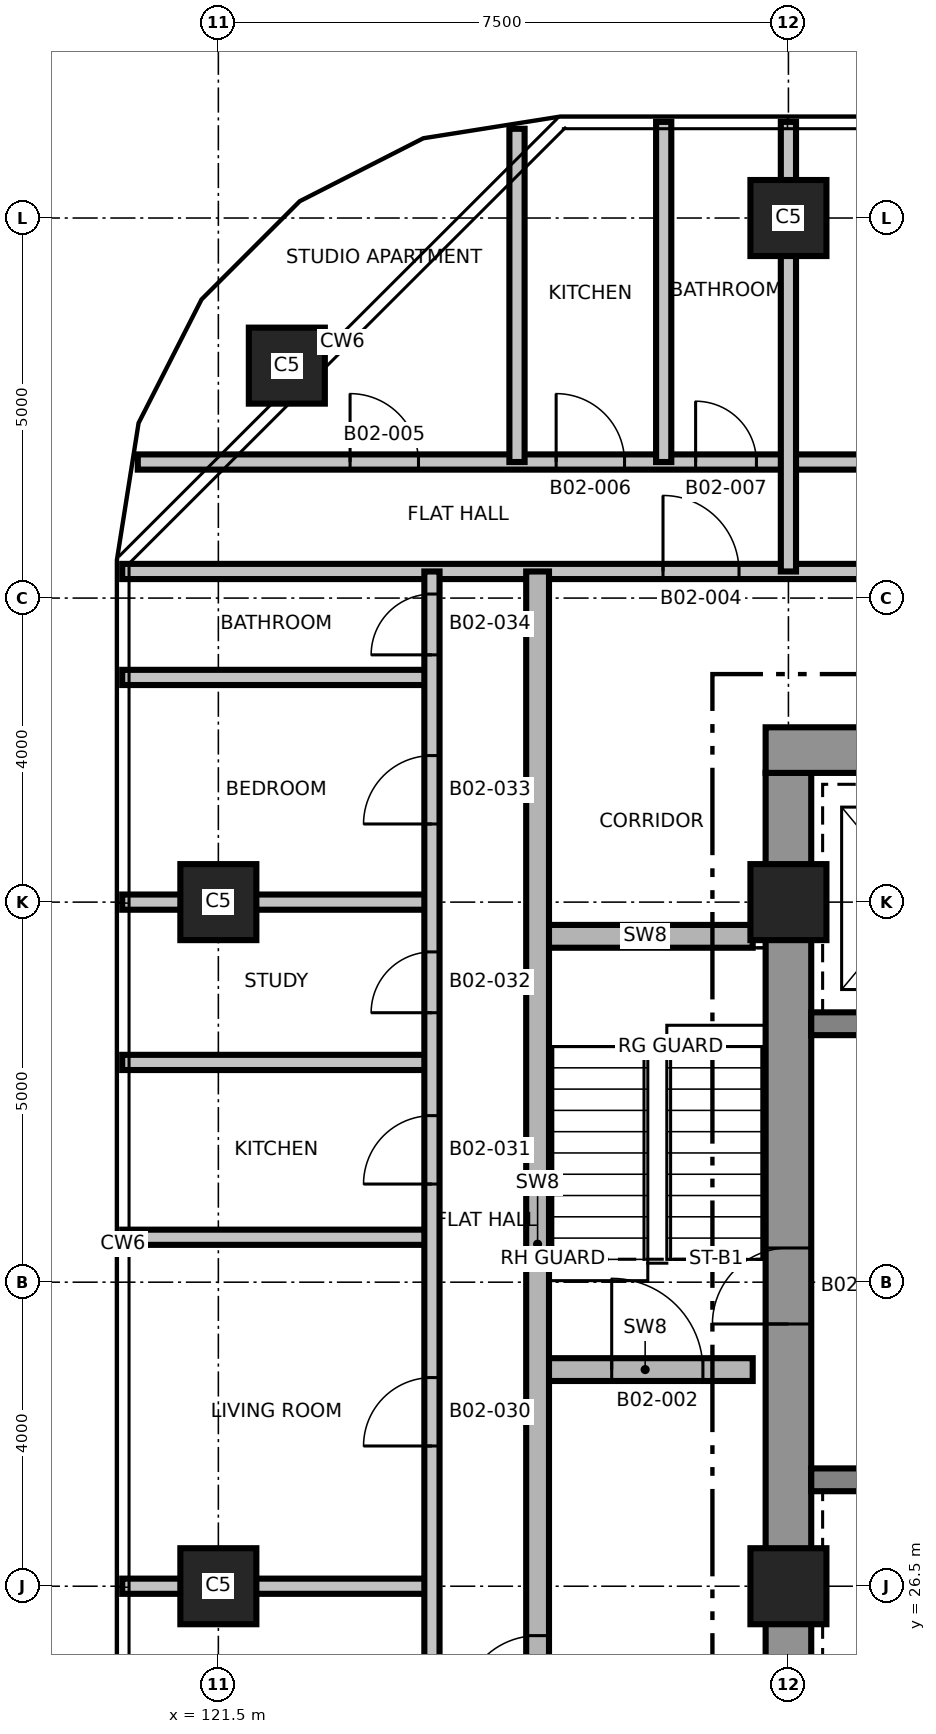
"""IFC4 building model, lengths in metres.
Left out: names, types, materials, properties, quantities, classifications, styles, units other than length and angle.
Written with IfcOpenShell. Run it as: python <this file> out.ifc"""

import sys

from ifc_helpers import new_model, si_unit, direction, frame, frame_2d, origin, origin_2d, place, context, subcontext, project, spatial, rectangle, extrude, element, fill, save


model = new_model("IFC4")
c1 = context("Model", 3, precision=1e-05, world=origin(), true_north=direction((0.0, 1.0)))
c2 = subcontext(c1, "Body", "Model", "MODEL_VIEW")
j1 = project(units=[si_unit("LENGTHUNIT", "METRE"), si_unit("PLANEANGLEUNIT", "RADIAN")], contexts=[c1])
p1 = place(None, origin())
s1 = spatial("IfcSite", under=j1, at=p1, CompositionType="ELEMENT")
p2 = place(p1, origin())
s2 = spatial("IfcBuilding", under=s1, at=p2, CompositionType="ELEMENT")
p3 = place(p2, frame((0.0, 0.0, 48.3)))
s3 = spatial("IfcBuildingStorey", under=s2, at=p3, CompositionType="ELEMENT", Elevation=48.3)
p4 = place(p3, frame((129.0, 24.8, 0.0), z_axis=(0.0, 0.0, 1.0), x_axis=(0.0, 1.0, 0.0)))
e1 = element("IfcWall", 1, at=p4, inside=s3, PredefinedType="SHEAR", context=c2, shape_type="SweptSolid", body=[
    extrude(rectangle(XDim=12.4, YDim=0.6, at=frame_2d((6.2, 0.0))), origin(), (0.0, 0.0, 1.0), 3.7),
])
p5 = place(p4, frame((5.15, 0.0, 0.0)))
e2 = element("IfcOpeningElement", 2, at=p5, cuts=e1, PredefinedType="OPENING", context=c2, shape_type="SweptSolid", body=[
    extrude(rectangle(XDim=1.0, YDim=2.1, at=frame_2d((0.5, 1.05))), frame((0.0, 0.31, 0.0), z_axis=(0.0, -1.0, 0.0), x_axis=(1.0, 0.0, 0.0)), (0.0, 0.0, 1.0), 0.62),
])
p6 = place(p3, frame((128.7, 37.5, 0.0), z_axis=(0.0, 0.0, 1.0), x_axis=(1.0, 0.0, 0.0)))
e3 = element("IfcWall", 3, at=p6, inside=s3, PredefinedType="SHEAR", context=c2, shape_type="SweptSolid", body=[
    extrude(rectangle(XDim=15.0, YDim=0.6, at=frame_2d((7.5, 0.0))), origin(), (0.0, 0.0, 1.0), 3.7),
])
p7 = place(p6, frame((9.65, 0.0, 0.0)))
e4 = element("IfcOpeningElement", 4, at=p7, cuts=e3, PredefinedType="OPENING", context=c2, shape_type="SweptSolid", body=[
    extrude(rectangle(XDim=1.5, YDim=2.1, at=frame_2d((0.75, 1.05))), frame((0.0, 0.31, 0.0), z_axis=(0.0, -1.0, 0.0), x_axis=(1.0, 0.0, 0.0)), (0.0, 0.0, 1.0), 0.62),
])
p8 = place(p6, frame((12.85, 0.0, 0.0)))
e5 = element("IfcOpeningElement", 5, at=p8, cuts=e3, PredefinedType="OPENING", context=c2, shape_type="SweptSolid", body=[
    extrude(rectangle(XDim=0.9, YDim=2.1, at=frame_2d((0.45, 1.05))), frame((0.0, 0.31, 0.0), z_axis=(0.0, -1.0, 0.0), x_axis=(1.0, 0.0, 0.0)), (0.0, 0.0, 1.0), 0.62),
])
p9 = place(p6, frame((5.55, 0.0, 0.0)))
e6 = element("IfcOpeningElement", 6, at=p9, cuts=e3, PredefinedType="OPENING", context=c2, shape_type="SweptSolid", body=[
    extrude(rectangle(XDim=0.9, YDim=2.1, at=frame_2d((0.45, 1.05))), frame((0.0, 0.31, 0.0), z_axis=(0.0, -1.0, 0.0), x_axis=(1.0, 0.0, 0.0)), (0.0, 0.0, 1.0), 0.62),
])
p10 = place(p3, frame((129.3, 27.9, 0.0), z_axis=(0.0, 0.0, 1.0), x_axis=(1.0, 0.0, 0.0)))
e7 = element("IfcWall", 7, at=p10, inside=s3, PredefinedType="SHEAR", context=c2, shape_type="SweptSolid", body=[
    extrude(rectangle(XDim=2.65, YDim=0.3, at=frame_2d((1.325, 0.0))), origin(), (0.0, 0.0, 1.0), 3.7),
])
p11 = place(p3, frame((129.3, 33.9, 0.0), z_axis=(0.0, 0.0, 1.0), x_axis=(1.0, 0.0, 0.0)))
e8 = element("IfcWall", 8, at=p11, inside=s3, PredefinedType="SHEAR", context=c2, shape_type="SweptSolid", body=[
    extrude(rectangle(XDim=2.65, YDim=0.3, at=frame_2d((1.325, 0.0))), origin(), (0.0, 0.0, 1.0), 3.7),
])
p12 = place(p11, frame((1.05, 0.0, 0.0)))
e9 = element("IfcOpeningElement", 9, at=p12, cuts=e8, PredefinedType="OPENING", context=c2, shape_type="SweptSolid", body=[
    extrude(rectangle(XDim=1.3, YDim=2.4, at=frame_2d((0.65, 1.2))), frame((0.0, 0.16, 0.0), z_axis=(0.0, -1.0, 0.0), x_axis=(1.0, 0.0, 0.0)), (0.0, 0.0, 1.0), 0.32),
])
for number, where, z_axis, x_axis in (
    (10, (121.5, 26.5, 0.0), (0.0, 0.0, 1.0), (1.0, 0.0, 0.0)),
    (11, (129.0, 26.5, 0.0), (0.0, 0.0, 1.0), (1.0, 0.0, 0.0)),
    (12, (121.5, 35.5, 0.0), (0.0, 0.0, 1.0), (1.0, 0.0, 0.0)),
    (13, (129.0, 35.5, 0.0), (0.0, 0.0, 1.0), (1.0, 0.0, 0.0)),
    (14, (122.401, 42.558, 0.0), (0.0, 0.0, 1.0), (1.0, 0.0, 0.0)),
    (15, (129.0, 44.5, 0.0), (0.0, 0.0, 1.0), (1.0, 0.0, 0.0)),
):
    element("IfcColumn", number, at=place(p3, frame(where, z_axis=z_axis, x_axis=x_axis)), inside=s3, PredefinedType="COLUMN", context=c2, shape_type="SweptSolid", body=[
        extrude(rectangle(XDim=1.0, YDim=1.0, at=origin_2d()), origin(), (0.0, 0.0, 1.0), 3.7),
    ])
p13 = place(p3, frame((120.235, 26.5, 0.0), z_axis=(0.0, 0.0, 1.0), x_axis=(1.0, 0.0, 0.0)))
e16 = element("IfcWall", 16, at=p13, inside=s3, PredefinedType="PARTITIONING", context=c2, shape_type="SweptSolid", body=[
    extrude(rectangle(XDim=4.075, YDim=0.2, at=frame_2d((2.038, 0.0))), origin(), (0.0, 0.0, 1.0), 3.4),
])
p14 = place(p3, frame((125.7, 29.35, 0.0), z_axis=(0.0, 0.0, 1.0), x_axis=(1.0, 0.0, 0.0)))
e17 = element("IfcWall", 17, at=p14, inside=s3, PredefinedType="SHEAR", context=c2, shape_type="SweptSolid", body=[
    extrude(rectangle(XDim=2.83, YDim=0.3, at=frame_2d((1.415, 0.0))), origin(), (0.0, 0.0, 1.0), 3.4),
])
p15 = place(p14, frame((0.975, 0.0, 0.0)))
e18 = element("IfcOpeningElement", 18, at=p15, cuts=e17, PredefinedType="OPENING", context=c2, shape_type="SweptSolid", body=[
    extrude(rectangle(XDim=1.2, YDim=2.1, at=frame_2d((0.6, 1.05))), frame((0.0, 0.16, 0.0), z_axis=(0.0, -1.0, 0.0), x_axis=(1.0, 0.0, 0.0)), (0.0, 0.0, 1.0), 0.32),
])
for number, where, z_axis, x_axis in (
    (19, (120.235, 31.091, 0.0), (0.0, 0.0, 1.0), (1.0, 0.0, 0.0)),
    (20, (120.235, 33.391, 0.0), (0.0, 0.0, 1.0), (1.0, 0.0, 0.0)),
):
    element("IfcWall", number, at=place(p3, frame(where, z_axis=z_axis, x_axis=x_axis)), inside=s3, PredefinedType="PARTITIONING", context=c2, shape_type="SweptSolid", body=[
        extrude(rectangle(XDim=4.075, YDim=0.2, at=frame_2d((2.038, 0.0))), origin(), (0.0, 0.0, 1.0), 3.4),
    ])
p16 = place(p3, frame((125.7, 35.05, 0.0), z_axis=(0.0, 0.0, 1.0), x_axis=(1.0, 0.0, 0.0)))
e21 = element("IfcWall", 21, at=p16, inside=s3, PredefinedType="SHEAR", context=c2, shape_type="SweptSolid", body=[
    extrude(rectangle(XDim=2.83, YDim=0.3, at=frame_2d((1.415, 0.0))), origin(), (0.0, 0.0, 1.0), 3.4),
])
for number, where, z_axis, x_axis in (
    (22, (120.235, 35.5, 0.0), (0.0, 0.0, 1.0), (1.0, 0.0, 0.0)),
    (23, (120.235, 38.456, 0.0), (0.0, 0.0, 1.0), (1.0, 0.0, 0.0)),
):
    element("IfcWall", number, at=place(p3, frame(where, z_axis=z_axis, x_axis=x_axis)), inside=s3, PredefinedType="PARTITIONING", context=c2, shape_type="SweptSolid", body=[
        extrude(rectangle(XDim=4.075, YDim=0.2, at=frame_2d((2.038, 0.0))), origin(), (0.0, 0.0, 1.0), 3.4),
    ])
p17 = place(p3, frame((120.235, 39.85, 0.0), z_axis=(0.0, 0.0, 1.0), x_axis=(1.0, 0.0, 0.0)))
e24 = element("IfcWall", 24, at=p17, inside=s3, PredefinedType="PARTITIONING", context=c2, shape_type="SweptSolid", body=[
    extrude(rectangle(XDim=32.53, YDim=0.2, at=frame_2d((16.265, 0.0))), origin(), (0.0, 0.0, 1.0), 3.4),
])
p18 = place(p17, frame((7.115, 0.0, 0.0)))
e25 = element("IfcOpeningElement", 25, at=p18, cuts=e24, PredefinedType="OPENING", context=c2, shape_type="SweptSolid", body=[
    extrude(rectangle(XDim=1.0, YDim=2.1, at=frame_2d((0.5, 1.05))), frame((0.0, 0.11, 0.0), z_axis=(0.0, -1.0, 0.0), x_axis=(1.0, 0.0, 0.0)), (0.0, 0.0, 1.0), 0.22),
])
p19 = place(p17, frame((15.765, 0.0, 0.0)))
e26 = element("IfcOpeningElement", 26, at=p19, cuts=e24, PredefinedType="OPENING", context=c2, shape_type="SweptSolid", body=[
    extrude(rectangle(XDim=1.0, YDim=2.1, at=frame_2d((0.5, 1.05))), frame((0.0, 0.11, 0.0), z_axis=(0.0, -1.0, 0.0), x_axis=(1.0, 0.0, 0.0)), (0.0, 0.0, 1.0), 0.22),
])
p20 = place(p17, frame((24.415, 0.0, 0.0)))
e27 = element("IfcOpeningElement", 27, at=p20, cuts=e24, PredefinedType="OPENING", context=c2, shape_type="SweptSolid", body=[
    extrude(rectangle(XDim=1.0, YDim=2.1, at=frame_2d((0.5, 1.05))), frame((0.0, 0.11, 0.0), z_axis=(0.0, -1.0, 0.0), x_axis=(1.0, 0.0, 0.0)), (0.0, 0.0, 1.0), 0.22),
])
p21 = place(p3, frame((120.44, 41.29, 0.0), z_axis=(0.0, 0.0, 1.0), x_axis=(1.0, 0.0, 0.0)))
e28 = element("IfcWall", 28, at=p21, inside=s3, PredefinedType="PARTITIONING", context=c2, shape_type="SweptSolid", body=[
    extrude(rectangle(XDim=32.12, YDim=0.2, at=frame_2d((16.06, 0.0))), origin(), (0.0, 0.0, 1.0), 3.4),
])
p22 = place(p21, frame((2.793, 0.0, 0.0)))
e29 = element("IfcOpeningElement", 29, at=p22, cuts=e28, PredefinedType="OPENING", context=c2, shape_type="SweptSolid", body=[
    extrude(rectangle(XDim=0.9, YDim=2.1, at=frame_2d((0.45, 1.05))), frame((0.0, 0.11, 0.0), z_axis=(0.0, -1.0, 0.0), x_axis=(1.0, 0.0, 0.0)), (0.0, 0.0, 1.0), 0.22),
])
p23 = place(p21, frame((5.504, 0.0, 0.0)))
e30 = element("IfcOpeningElement", 30, at=p23, cuts=e28, PredefinedType="OPENING", context=c2, shape_type="SweptSolid", body=[
    extrude(rectangle(XDim=0.9, YDim=2.1, at=frame_2d((0.45, 1.05))), frame((0.0, 0.11, 0.0), z_axis=(0.0, -1.0, 0.0), x_axis=(1.0, 0.0, 0.0)), (0.0, 0.0, 1.0), 0.22),
])
p24 = place(p21, frame((7.339, 0.0, 0.0)))
e31 = element("IfcOpeningElement", 31, at=p24, cuts=e28, PredefinedType="OPENING", context=c2, shape_type="SweptSolid", body=[
    extrude(rectangle(XDim=0.8, YDim=2.1, at=frame_2d((0.4, 1.05))), frame((0.0, 0.11, 0.0), z_axis=(0.0, -1.0, 0.0), x_axis=(1.0, 0.0, 0.0)), (0.0, 0.0, 1.0), 0.22),
])
p25 = place(p21, frame((10.577, 0.0, 0.0)))
e32 = element("IfcOpeningElement", 32, at=p25, cuts=e28, PredefinedType="OPENING", context=c2, shape_type="SweptSolid", body=[
    extrude(rectangle(XDim=0.9, YDim=2.1, at=frame_2d((0.45, 1.05))), frame((0.0, 0.11, 0.0), z_axis=(0.0, -1.0, 0.0), x_axis=(1.0, 0.0, 0.0)), (0.0, 0.0, 1.0), 0.22),
])
p26 = place(p21, frame((14.327, 0.0, 0.0)))
e33 = element("IfcOpeningElement", 33, at=p26, cuts=e28, PredefinedType="OPENING", context=c2, shape_type="SweptSolid", body=[
    extrude(rectangle(XDim=0.9, YDim=2.1, at=frame_2d((0.45, 1.05))), frame((0.0, 0.11, 0.0), z_axis=(0.0, -1.0, 0.0), x_axis=(1.0, 0.0, 0.0)), (0.0, 0.0, 1.0), 0.22),
])
p27 = place(p21, frame((18.144, 0.0, 0.0)))
e34 = element("IfcOpeningElement", 34, at=p27, cuts=e28, PredefinedType="OPENING", context=c2, shape_type="SweptSolid", body=[
    extrude(rectangle(XDim=0.9, YDim=2.1, at=frame_2d((0.45, 1.05))), frame((0.0, 0.11, 0.0), z_axis=(0.0, -1.0, 0.0), x_axis=(1.0, 0.0, 0.0)), (0.0, 0.0, 1.0), 0.22),
])
p28 = place(p21, frame((21.944, 0.0, 0.0)))
e35 = element("IfcOpeningElement", 35, at=p28, cuts=e28, PredefinedType="OPENING", context=c2, shape_type="SweptSolid", body=[
    extrude(rectangle(XDim=0.8, YDim=2.1, at=frame_2d((0.4, 1.05))), frame((0.0, 0.11, 0.0), z_axis=(0.0, -1.0, 0.0), x_axis=(1.0, 0.0, 0.0)), (0.0, 0.0, 1.0), 0.22),
])
p29 = place(p21, frame((23.981, 0.0, 0.0)))
e36 = element("IfcOpeningElement", 36, at=p29, cuts=e28, PredefinedType="OPENING", context=c2, shape_type="SweptSolid", body=[
    extrude(rectangle(XDim=0.8, YDim=2.1, at=frame_2d((0.4, 1.05))), frame((0.0, 0.11, 0.0), z_axis=(0.0, -1.0, 0.0), x_axis=(1.0, 0.0, 0.0)), (0.0, 0.0, 1.0), 0.22),
])
p30 = place(p21, frame((25.716, 0.0, 0.0)))
e37 = element("IfcOpeningElement", 37, at=p30, cuts=e28, PredefinedType="OPENING", context=c2, shape_type="SweptSolid", body=[
    extrude(rectangle(XDim=0.9, YDim=2.1, at=frame_2d((0.45, 1.05))), frame((0.0, 0.11, 0.0), z_axis=(0.0, -1.0, 0.0), x_axis=(1.0, 0.0, 0.0)), (0.0, 0.0, 1.0), 0.22),
])
p31 = place(p21, frame((28.427, 0.0, 0.0)))
e38 = element("IfcOpeningElement", 38, at=p31, cuts=e28, PredefinedType="OPENING", context=c2, shape_type="SweptSolid", body=[
    extrude(rectangle(XDim=0.9, YDim=2.1, at=frame_2d((0.45, 1.05))), frame((0.0, 0.11, 0.0), z_axis=(0.0, -1.0, 0.0), x_axis=(1.0, 0.0, 0.0)), (0.0, 0.0, 1.0), 0.22),
])
p32 = place(p3, frame((124.31, 22.15, 0.0), z_axis=(0.0, 0.0, 1.0), x_axis=(0.0, 1.0, 0.0)))
e39 = element("IfcWall", 39, at=p32, inside=s3, PredefinedType="PARTITIONING", context=c2, shape_type="SweptSolid", body=[
    extrude(rectangle(XDim=17.7, YDim=0.2, at=frame_2d((8.85, 0.0))), origin(), (0.0, 0.0, 1.0), 3.4),
])
p33 = place(p32, frame((1.725, 0.0, 0.0)))
e40 = element("IfcOpeningElement", 40, at=p33, cuts=e39, PredefinedType="OPENING", context=c2, shape_type="SweptSolid", body=[
    extrude(rectangle(XDim=0.9, YDim=2.1, at=frame_2d((0.45, 1.05))), frame((0.0, 0.11, 0.0), z_axis=(0.0, -1.0, 0.0), x_axis=(1.0, 0.0, 0.0)), (0.0, 0.0, 1.0), 0.22),
])
p34 = place(p32, frame((6.195, 0.0, 0.0)))
e41 = element("IfcOpeningElement", 41, at=p34, cuts=e39, PredefinedType="OPENING", context=c2, shape_type="SweptSolid", body=[
    extrude(rectangle(XDim=0.9, YDim=2.1, at=frame_2d((0.45, 1.05))), frame((0.0, 0.11, 0.0), z_axis=(0.0, -1.0, 0.0), x_axis=(1.0, 0.0, 0.0)), (0.0, 0.0, 1.0), 0.22),
])
p35 = place(p32, frame((9.641, 0.0, 0.0)))
e42 = element("IfcOpeningElement", 42, at=p35, cuts=e39, PredefinedType="OPENING", context=c2, shape_type="SweptSolid", body=[
    extrude(rectangle(XDim=0.9, YDim=2.1, at=frame_2d((0.45, 1.05))), frame((0.0, 0.11, 0.0), z_axis=(0.0, -1.0, 0.0), x_axis=(1.0, 0.0, 0.0)), (0.0, 0.0, 1.0), 0.22),
])
p36 = place(p32, frame((11.895, 0.0, 0.0)))
e43 = element("IfcOpeningElement", 43, at=p36, cuts=e39, PredefinedType="OPENING", context=c2, shape_type="SweptSolid", body=[
    extrude(rectangle(XDim=0.8, YDim=2.1, at=frame_2d((0.4, 1.05))), frame((0.0, 0.11, 0.0), z_axis=(0.0, -1.0, 0.0), x_axis=(1.0, 0.0, 0.0)), (0.0, 0.0, 1.0), 0.22),
])
p37 = place(p32, frame((14.378, 0.0, 0.0)))
e44 = element("IfcOpeningElement", 44, at=p37, cuts=e39, PredefinedType="OPENING", context=c2, shape_type="SweptSolid", body=[
    extrude(rectangle(XDim=0.9, YDim=2.1, at=frame_2d((0.45, 1.05))), frame((0.0, 0.11, 0.0), z_axis=(0.0, -1.0, 0.0), x_axis=(1.0, 0.0, 0.0)), (0.0, 0.0, 1.0), 0.22),
])
p38 = place(p32, frame((16.603, 0.0, 0.0)))
e45 = element("IfcOpeningElement", 45, at=p38, cuts=e39, PredefinedType="OPENING", context=c2, shape_type="SweptSolid", body=[
    extrude(rectangle(XDim=0.8, YDim=2.1, at=frame_2d((0.4, 1.05))), frame((0.0, 0.11, 0.0), z_axis=(0.0, -1.0, 0.0), x_axis=(1.0, 0.0, 0.0)), (0.0, 0.0, 1.0), 0.22),
])
p39 = place(p3, frame((125.429, 41.29, 0.0), z_axis=(0.0, 0.0, 1.0), x_axis=(0.0, 1.0, 0.0)))
e46 = element("IfcWall", 46, at=p39, inside=s3, PredefinedType="PARTITIONING", context=c2, shape_type="SweptSolid", body=[
    extrude(rectangle(XDim=4.384, YDim=0.2, at=frame_2d((2.192, 0.0))), origin(), (0.0, 0.0, 1.0), 3.4),
])
p40 = place(p3, frame((125.7, 22.15, 0.0), z_axis=(0.0, 0.0, 1.0), x_axis=(0.0, 1.0, 0.0)))
e47 = element("IfcWall", 47, at=p40, inside=s3, PredefinedType="SHEAR", context=c2, shape_type="SweptSolid", body=[
    extrude(rectangle(XDim=17.7, YDim=0.3, at=frame_2d((8.85, 0.0))), origin(), (0.0, 0.0, 1.0), 3.4),
])
p41 = place(p40, frame((2.7, 0.0, 0.0)))
e48 = element("IfcOpeningElement", 48, at=p41, cuts=e47, PredefinedType="OPENING", context=c2, shape_type="SweptSolid", body=[
    extrude(rectangle(XDim=1.0, YDim=2.1, at=frame_2d((0.5, 1.05))), frame((0.0, 0.16, 0.0), z_axis=(0.0, -1.0, 0.0), x_axis=(1.0, 0.0, 0.0)), (0.0, 0.0, 1.0), 0.32),
])
p42 = place(p3, frame((127.359, 41.29, 0.0), z_axis=(0.0, 0.0, 1.0), x_axis=(0.0, 1.0, 0.0)))
e49 = element("IfcWall", 49, at=p42, inside=s3, PredefinedType="PARTITIONING", context=c2, shape_type="SweptSolid", body=[
    extrude(rectangle(XDim=4.475, YDim=0.2, at=frame_2d((2.237, 0.0))), origin(), (0.0, 0.0, 1.0), 3.4),
])
p43 = place(p3, frame((129.0, 39.85, 0.0), z_axis=(0.0, 0.0, 1.0), x_axis=(0.0, 1.0, 0.0)))
e50 = element("IfcWall", 50, at=p43, inside=s3, PredefinedType="PARTITIONING", context=c2, shape_type="SweptSolid", body=[
    extrude(rectangle(XDim=5.915, YDim=0.2, at=frame_2d((2.958, 0.0))), origin(), (0.0, 0.0, 1.0), 3.4),
])
p44 = place(p15, origin())
e51 = element("IfcDoor", 51, at=p44, inside=s3, OperationType="SINGLE_SWING_RIGHT", PredefinedType="DOOR", context=c2, shape_type="SweptSolid", body=[
    extrude(rectangle(XDim=1.2, YDim=2.1, at=frame_2d((0.6, 1.05))), frame((0.0, 0.025, 0.0), z_axis=(0.0, -1.0, 0.0), x_axis=(1.0, 0.0, 0.0)), (0.0, 0.0, 1.0), 0.05),
])
fill(e18, e51)
p45 = place(p18, origin())
e52 = element("IfcDoor", 52, at=p45, inside=s3, OperationType="SINGLE_SWING_RIGHT", PredefinedType="DOOR", context=c2, shape_type="SweptSolid", body=[
    extrude(rectangle(XDim=1.0, YDim=2.1, at=frame_2d((0.5, 1.05))), frame((0.0, 0.025, 0.0), z_axis=(0.0, -1.0, 0.0), x_axis=(1.0, 0.0, 0.0)), (0.0, 0.0, 1.0), 0.05),
])
fill(e25, e52)
p46 = place(p22, origin())
e53 = element("IfcDoor", 53, at=p46, inside=s3, OperationType="SINGLE_SWING_LEFT", PredefinedType="DOOR", context=c2, shape_type="SweptSolid", body=[
    extrude(rectangle(XDim=0.9, YDim=2.1, at=frame_2d((0.45, 1.05))), frame((0.0, 0.025, 0.0), z_axis=(0.0, -1.0, 0.0), x_axis=(1.0, 0.0, 0.0)), (0.0, 0.0, 1.0), 0.05),
])
fill(e29, e53)
p47 = place(p23, origin())
e54 = element("IfcDoor", 54, at=p47, inside=s3, OperationType="SINGLE_SWING_RIGHT", PredefinedType="DOOR", context=c2, shape_type="SweptSolid", body=[
    extrude(rectangle(XDim=0.9, YDim=2.1, at=frame_2d((0.45, 1.05))), frame((0.0, 0.025, 0.0), z_axis=(0.0, -1.0, 0.0), x_axis=(1.0, 0.0, 0.0)), (0.0, 0.0, 1.0), 0.05),
])
fill(e30, e54)
p48 = place(p24, origin())
e55 = element("IfcDoor", 55, at=p48, inside=s3, OperationType="SINGLE_SWING_LEFT", PredefinedType="DOOR", context=c2, shape_type="SweptSolid", body=[
    extrude(rectangle(XDim=0.8, YDim=2.1, at=frame_2d((0.4, 1.05))), frame((0.0, 0.025, 0.0), z_axis=(0.0, -1.0, 0.0), x_axis=(1.0, 0.0, 0.0)), (0.0, 0.0, 1.0), 0.05),
])
fill(e31, e55)
p49 = place(p41, origin())
e56 = element("IfcDoor", 56, at=p49, inside=s3, OperationType="SINGLE_SWING_RIGHT", PredefinedType="DOOR", context=c2, shape_type="SweptSolid", body=[
    extrude(rectangle(XDim=1.0, YDim=2.1, at=frame_2d((0.5, 1.05))), frame((0.0, 0.025, 0.0), z_axis=(0.0, -1.0, 0.0), x_axis=(1.0, 0.0, 0.0)), (0.0, 0.0, 1.0), 0.05),
])
fill(e48, e56)
p50 = place(p34, origin())
e57 = element("IfcDoor", 57, at=p50, inside=s3, OperationType="SINGLE_SWING_RIGHT", PredefinedType="DOOR", context=c2, shape_type="SweptSolid", body=[
    extrude(rectangle(XDim=0.9, YDim=2.1, at=frame_2d((0.45, 1.05))), frame((0.0, 0.025, 0.0), z_axis=(0.0, -1.0, 0.0), x_axis=(1.0, 0.0, 0.0)), (0.0, 0.0, 1.0), 0.05),
])
fill(e41, e57)
p51 = place(p35, origin())
e58 = element("IfcDoor", 58, at=p51, inside=s3, OperationType="SINGLE_SWING_LEFT", PredefinedType="DOOR", context=c2, shape_type="SweptSolid", body=[
    extrude(rectangle(XDim=0.9, YDim=2.1, at=frame_2d((0.45, 1.05))), frame((0.0, 0.025, 0.0), z_axis=(0.0, -1.0, 0.0), x_axis=(1.0, 0.0, 0.0)), (0.0, 0.0, 1.0), 0.05),
])
fill(e42, e58)
p52 = place(p36, origin())
e59 = element("IfcDoor", 59, at=p52, inside=s3, OperationType="SINGLE_SWING_RIGHT", PredefinedType="DOOR", context=c2, shape_type="SweptSolid", body=[
    extrude(rectangle(XDim=0.8, YDim=2.1, at=frame_2d((0.4, 1.05))), frame((0.0, 0.025, 0.0), z_axis=(0.0, -1.0, 0.0), x_axis=(1.0, 0.0, 0.0)), (0.0, 0.0, 1.0), 0.05),
])
fill(e43, e59)
p53 = place(p37, origin())
e60 = element("IfcDoor", 60, at=p53, inside=s3, OperationType="SINGLE_SWING_LEFT", PredefinedType="DOOR", context=c2, shape_type="SweptSolid", body=[
    extrude(rectangle(XDim=0.9, YDim=2.1, at=frame_2d((0.45, 1.05))), frame((0.0, 0.025, 0.0), z_axis=(0.0, -1.0, 0.0), x_axis=(1.0, 0.0, 0.0)), (0.0, 0.0, 1.0), 0.05),
])
fill(e44, e60)
p54 = place(p38, origin())
e61 = element("IfcDoor", 61, at=p54, inside=s3, OperationType="SINGLE_SWING_RIGHT", PredefinedType="DOOR", context=c2, shape_type="SweptSolid", body=[
    extrude(rectangle(XDim=0.8, YDim=2.1, at=frame_2d((0.4, 1.05))), frame((0.0, 0.025, 0.0), z_axis=(0.0, -1.0, 0.0), x_axis=(1.0, 0.0, 0.0)), (0.0, 0.0, 1.0), 0.05),
])
fill(e45, e61)
p55 = place(p5, origin())
e62 = element("IfcDoor", 62, at=p55, inside=s3, OperationType="SINGLE_SWING_RIGHT", PredefinedType="DOOR", context=c2, shape_type="SweptSolid", body=[
    extrude(rectangle(XDim=1.0, YDim=2.1, at=frame_2d((0.5, 1.05))), frame((0.0, 0.025, 0.0), z_axis=(0.0, -1.0, 0.0), x_axis=(1.0, 0.0, 0.0)), (0.0, 0.0, 1.0), 0.05),
])
fill(e2, e62)
save(model, sys.argv[1])
